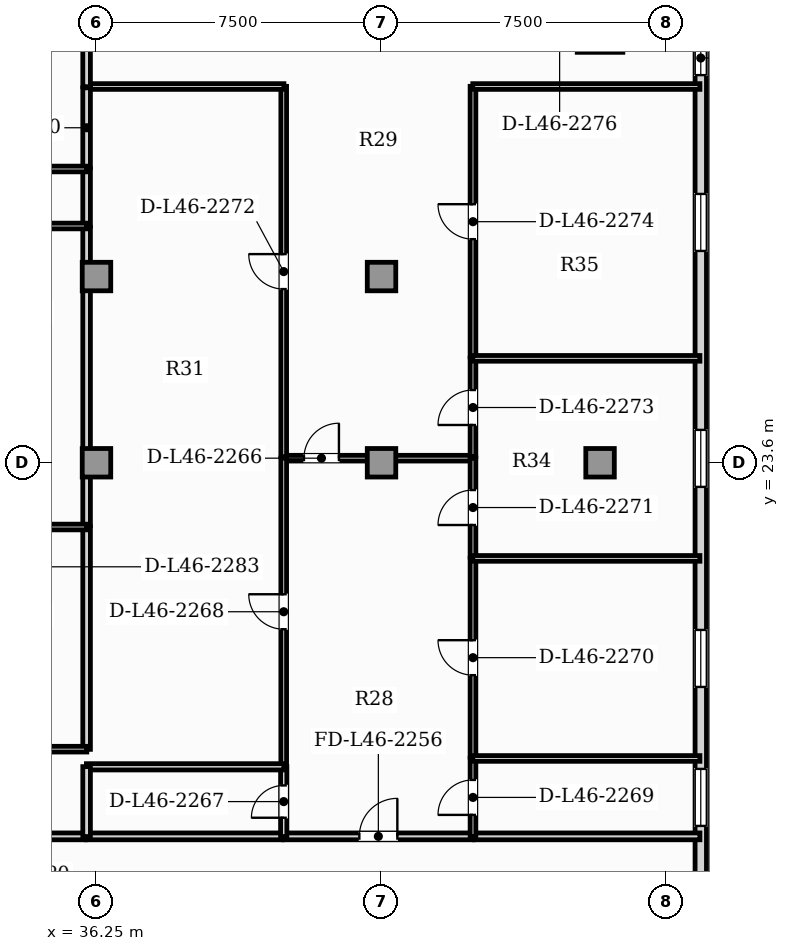
"""IFC4 building model, lengths in metres.
Left out: names, types, materials, properties, quantities, classifications, styles, units other than length and angle.
Written with IfcOpenShell. Run it as: python <this file> out.ifc"""

import sys

from ifc_helpers import new_model, si_unit, direction, frame, frame_2d, origin, origin_2d, place, context, subcontext, project, spatial, rectangle, hollow_rectangle, extrude, element, fill, save


model = new_model("IFC4")
c1 = context("Model", 3, precision=1e-05, world=origin(), true_north=direction((0.0, 1.0)))
c2 = subcontext(c1, "Body", "Model", "MODEL_VIEW")
j1 = project(units=[si_unit("LENGTHUNIT", "METRE"), si_unit("PLANEANGLEUNIT", "RADIAN")], contexts=[c1])
p1 = place(None, origin())
s1 = spatial("IfcSite", under=j1, at=p1, CompositionType="ELEMENT")
p2 = place(p1, origin())
s2 = spatial("IfcBuilding", under=s1, at=p2, CompositionType="ELEMENT")
p3 = place(p2, frame((0.0, 0.0, 187.55)))
s3 = spatial("IfcBuildingStorey", under=s2, at=p3, CompositionType="ELEMENT", Elevation=187.55)
p4 = place(p3, frame((49.5, 35.0, 0.0), z_axis=(0.0, 0.0, 1.0), x_axis=(1.0, 0.0, 0.0)))
e1 = element("IfcColumn", 1, at=p4, inside=s3, PredefinedType="USERDEFINED", context=c2, shape_type="SweptSolid", body=[
    extrude(hollow_rectangle(XDim=1.2, YDim=1.2, WallThickness=0.07, at=origin_2d()), origin(), (0.0, 0.0, 1.0), 5.05),
])
for number, where, z_axis, x_axis in (
    (2, (36.25, 23.6, 0.0), (0.0, 0.0, 1.0), (1.0, 0.0, 0.0)),
    (3, (43.75, 23.6, 0.0), (0.0, 0.0, 1.0), (1.0, 0.0, 0.0)),
    (4, (49.5, 23.6, 0.0), (0.0, 0.0, 1.0), (1.0, 0.0, 0.0)),
    (5, (36.25, 28.5, 0.0), (0.0, 0.0, 1.0), (1.0, 0.0, 0.0)),
    (6, (43.75, 28.5, 0.0), (0.0, 0.0, 1.0), (1.0, 0.0, 0.0)),
):
    element("IfcColumn", number, at=place(p3, frame(where, z_axis=z_axis, x_axis=x_axis)), inside=s3, PredefinedType="COLUMN", context=c2, shape_type="SweptSolid", body=[
        extrude(rectangle(XDim=0.75, YDim=0.75, at=origin_2d()), origin(), (0.0, 0.0, 1.0), 5.05),
    ])
p5 = place(p3, frame((52.15, 3.24, 0.0), z_axis=(0.0, 0.0, 1.0), x_axis=(0.0, 1.0, 0.0)))
e7 = element("IfcWall", 7, at=p5, inside=s3, PredefinedType="SOLIDWALL", context=c2, shape_type="SweptSolid", body=[
    extrude(rectangle(XDim=33.92, YDim=0.3, at=frame_2d((16.96, 0.0))), origin(), (0.0, 0.0, 1.0), 4.83),
])
p6 = place(p5, frame((30.56, 0.0, 0.95)))
e8 = element("IfcOpeningElement", 8, at=p6, cuts=e7, PredefinedType="OPENING", context=c2, shape_type="SweptSolid", body=[
    extrude(rectangle(XDim=0.9, YDim=1.5, at=frame_2d((0.45, 0.75))), frame((0.0, 0.16, 0.0), z_axis=(0.0, -1.0, 0.0), x_axis=(1.0, 0.0, 0.0)), (0.0, 0.0, 1.0), 0.32),
])
p7 = place(p5, frame((10.805, 0.0, 0.9)))
e9 = element("IfcOpeningElement", 9, at=p7, cuts=e7, PredefinedType="OPENING", context=c2, shape_type="SweptSolid", body=[
    extrude(rectangle(XDim=1.5, YDim=1.95, at=frame_2d((0.75, 0.975))), frame((0.0, 0.16, 0.0), z_axis=(0.0, -1.0, 0.0), x_axis=(1.0, 0.0, 0.0)), (0.0, 0.0, 1.0), 0.32),
])
p8 = place(p5, frame((14.462, 0.0, 0.9)))
e10 = element("IfcOpeningElement", 10, at=p8, cuts=e7, PredefinedType="OPENING", context=c2, shape_type="SweptSolid", body=[
    extrude(rectangle(XDim=1.5, YDim=1.95, at=frame_2d((0.75, 0.975))), frame((0.0, 0.16, 0.0), z_axis=(0.0, -1.0, 0.0), x_axis=(1.0, 0.0, 0.0)), (0.0, 0.0, 1.0), 0.32),
])
p9 = place(p5, frame((19.726, 0.0, 0.9)))
e11 = element("IfcOpeningElement", 11, at=p9, cuts=e7, PredefinedType="OPENING", context=c2, shape_type="SweptSolid", body=[
    extrude(rectangle(XDim=1.5, YDim=1.95, at=frame_2d((0.75, 0.975))), frame((0.0, 0.16, 0.0), z_axis=(0.0, -1.0, 0.0), x_axis=(1.0, 0.0, 0.0)), (0.0, 0.0, 1.0), 0.32),
])
p10 = place(p5, frame((25.934, 0.0, 0.9)))
e12 = element("IfcOpeningElement", 12, at=p10, cuts=e7, PredefinedType="OPENING", context=c2, shape_type="SweptSolid", body=[
    extrude(rectangle(XDim=1.5, YDim=1.95, at=frame_2d((0.75, 0.975))), frame((0.0, 0.16, 0.0), z_axis=(0.0, -1.0, 0.0), x_axis=(1.0, 0.0, 0.0)), (0.0, 0.0, 1.0), 0.32),
])
p11 = place(p5, frame((32.24, 0.0, 0.95)))
e13 = element("IfcOpeningElement", 13, at=p11, cuts=e7, PredefinedType="OPENING", context=c2, shape_type="SweptSolid", body=[
    extrude(rectangle(XDim=0.9, YDim=1.5, at=frame_2d((0.45, 0.75))), frame((0.0, 0.16, 0.0), z_axis=(0.0, -1.0, 0.0), x_axis=(1.0, 0.0, 0.0)), (0.0, 0.0, 1.0), 0.32),
])
p12 = place(p3, frame((41.171, 13.77, 0.0), z_axis=(0.0, 0.0, 1.0), x_axis=(1.0, 0.0, 0.0)))
e14 = element("IfcWall", 14, at=p12, inside=s3, PredefinedType="PARTITIONING", context=c2, shape_type="SweptSolid", body=[
    extrude(rectangle(XDim=4.99, YDim=0.18, at=frame_2d((2.495, 0.0))), origin(), (0.0, 0.0, 1.0), 4.83),
])
p13 = place(p12, frame((1.995, 0.0, 0.0)))
e15 = element("IfcOpeningElement", 15, at=p13, cuts=e14, PredefinedType="OPENING", context=c2, shape_type="SweptSolid", body=[
    extrude(rectangle(XDim=1.0, YDim=2.15, at=frame_2d((0.5, 1.075))), frame((0.0, 0.1, 0.0), z_axis=(0.0, -1.0, 0.0), x_axis=(1.0, 0.0, 0.0)), (0.0, 0.0, 1.0), 0.2),
])
p14 = place(p3, frame((35.985, 13.77, 0.0), z_axis=(0.0, 0.0, 1.0), x_axis=(1.0, 0.0, 0.0)))
e16 = element("IfcWall", 16, at=p14, inside=s3, PredefinedType="PARTITIONING", context=c2, shape_type="SweptSolid", body=[
    extrude(rectangle(XDim=5.156, YDim=0.18, at=frame_2d((2.578, 0.0))), origin(), (0.0, 0.0, 1.0), 4.83),
])
p15 = place(p3, frame((46.191, 13.77, 0.0), z_axis=(0.0, 0.0, 1.0), x_axis=(1.0, 0.0, 0.0)))
e17 = element("IfcWall", 17, at=p15, inside=s3, PredefinedType="PARTITIONING", context=c2, shape_type="SweptSolid", body=[
    extrude(rectangle(XDim=5.936, YDim=0.18, at=frame_2d((2.968, 0.0))), origin(), (0.0, 0.0, 1.0), 4.83),
])
p16 = place(p3, frame((31.305, 13.77, 0.0), z_axis=(0.0, 0.0, 1.0), x_axis=(1.0, 0.0, 0.0)))
e18 = element("IfcWall", 18, at=p16, inside=s3, PredefinedType="PARTITIONING", context=c2, shape_type="SweptSolid", body=[
    extrude(rectangle(XDim=4.65, YDim=0.18, at=frame_2d((2.325, 0.0))), origin(), (0.0, 0.0, 1.0), 4.83),
])
p17 = place(p3, frame((41.171, 23.721, 0.0), z_axis=(0.0, 0.0, 1.0), x_axis=(1.0, 0.0, 0.0)))
e19 = element("IfcWall", 19, at=p17, inside=s3, PredefinedType="PARTITIONING", context=c2, shape_type="SweptSolid", body=[
    extrude(rectangle(XDim=4.99, YDim=0.15, at=frame_2d((2.495, 0.0))), origin(), (0.0, 0.0, 1.0), 4.285),
])
p18 = place(p17, frame((0.538, 0.0, 0.0)))
e20 = element("IfcOpeningElement", 20, at=p18, cuts=e19, PredefinedType="OPENING", context=c2, shape_type="SweptSolid", body=[
    extrude(rectangle(XDim=0.92, YDim=2.1, at=frame_2d((0.46, 1.05))), frame((0.0, 0.085, 0.0), z_axis=(0.0, -1.0, 0.0), x_axis=(1.0, 0.0, 0.0)), (0.0, 0.0, 1.0), 0.17),
])
p19 = place(p3, frame((41.177, 13.765, 0.0), z_axis=(0.0, 0.0, 1.0), x_axis=(0.0, 1.0, 0.0)))
e21 = element("IfcWall", 21, at=p19, inside=s3, PredefinedType="PLUMBINGWALL", context=c2, shape_type="SweptSolid", body=[
    extrude(rectangle(XDim=1.84, YDim=0.165, at=frame_2d((0.92, 0.0))), origin(), (0.0, 0.0, 1.0), 4.83),
])
p20 = place(p19, frame((0.495, 0.0, 0.0)))
e22 = element("IfcOpeningElement", 22, at=p20, cuts=e21, PredefinedType="OPENING", context=c2, shape_type="SweptSolid", body=[
    extrude(rectangle(XDim=0.85, YDim=2.1, at=frame_2d((0.425, 1.05))), frame((0.0, 0.093, 0.0), z_axis=(0.0, -1.0, 0.0), x_axis=(1.0, 0.0, 0.0)), (0.0, 0.0, 1.0), 0.185),
])
p21 = place(p3, frame((41.177, 15.635, 0.0), z_axis=(0.0, 0.0, 1.0), x_axis=(0.0, 1.0, 0.0)))
e23 = element("IfcWall", 23, at=p21, inside=s3, PredefinedType="PARTITIONING", context=c2, shape_type="SweptSolid", body=[
    extrude(rectangle(XDim=8.091, YDim=0.15, at=frame_2d((4.045, 0.0))), origin(), (0.0, 0.0, 1.0), 4.83),
])
p22 = place(p21, frame((3.585, 0.0, 0.0)))
e24 = element("IfcOpeningElement", 24, at=p22, cuts=e23, PredefinedType="OPENING", context=c2, shape_type="SweptSolid", body=[
    extrude(rectangle(XDim=0.92, YDim=2.1, at=frame_2d((0.46, 1.05))), frame((0.0, 0.085, 0.0), z_axis=(0.0, -1.0, 0.0), x_axis=(1.0, 0.0, 0.0)), (0.0, 0.0, 1.0), 0.17),
])
p23 = place(p3, frame((46.156, 13.765, 0.0), z_axis=(0.0, 0.0, 1.0), x_axis=(0.0, 1.0, 0.0)))
e25 = element("IfcWall", 25, at=p23, inside=s3, PredefinedType="PARTITIONING", context=c2, shape_type="SweptSolid", body=[
    extrude(rectangle(XDim=2.06, YDim=0.15, at=frame_2d((1.03, 0.0))), origin(), (0.0, 0.0, 1.0), 4.83),
])
p24 = place(p23, frame((0.57, 0.0, 0.0)))
e26 = element("IfcOpeningElement", 26, at=p24, cuts=e25, PredefinedType="OPENING", context=c2, shape_type="SweptSolid", body=[
    extrude(rectangle(XDim=0.92, YDim=2.1, at=frame_2d((0.46, 1.05))), frame((0.0, 0.085, 0.0), z_axis=(0.0, -1.0, 0.0), x_axis=(1.0, 0.0, 0.0)), (0.0, 0.0, 1.0), 0.17),
])
p25 = place(p3, frame((46.156, 15.855, 0.0), z_axis=(0.0, 0.0, 1.0), x_axis=(0.0, 1.0, 0.0)))
e27 = element("IfcWall", 27, at=p25, inside=s3, PredefinedType="PARTITIONING", context=c2, shape_type="SweptSolid", body=[
    extrude(rectangle(XDim=5.234, YDim=0.15, at=frame_2d((2.617, 0.0))), origin(), (0.0, 0.0, 1.0), 4.83),
])
p26 = place(p25, frame((2.157, 0.0, 0.0)))
e28 = element("IfcOpeningElement", 28, at=p26, cuts=e27, PredefinedType="OPENING", context=c2, shape_type="SweptSolid", body=[
    extrude(rectangle(XDim=0.92, YDim=2.1, at=frame_2d((0.46, 1.05))), frame((0.0, 0.085, 0.0), z_axis=(0.0, -1.0, 0.0), x_axis=(1.0, 0.0, 0.0)), (0.0, 0.0, 1.0), 0.17),
])
p27 = place(p3, frame((46.156, 21.119, 0.0), z_axis=(0.0, 0.0, 1.0), x_axis=(0.0, 1.0, 0.0)))
e29 = element("IfcWall", 29, at=p27, inside=s3, PredefinedType="PARTITIONING", context=c2, shape_type="SweptSolid", body=[
    extrude(rectangle(XDim=2.607, YDim=0.15, at=frame_2d((1.304, 0.0))), origin(), (0.0, 0.0, 1.0), 4.83),
])
p28 = place(p27, frame((0.844, 0.0, 0.0)))
e30 = element("IfcOpeningElement", 30, at=p28, cuts=e29, PredefinedType="OPENING", context=c2, shape_type="SweptSolid", body=[
    extrude(rectangle(XDim=0.92, YDim=2.1, at=frame_2d((0.46, 1.05))), frame((0.0, 0.085, 0.0), z_axis=(0.0, -1.0, 0.0), x_axis=(1.0, 0.0, 0.0)), (0.0, 0.0, 1.0), 0.17),
])
p29 = place(p3, frame((41.177, 23.756, 0.0), z_axis=(0.0, 0.0, 1.0), x_axis=(0.0, 1.0, 0.0)))
e31 = element("IfcWall", 31, at=p29, inside=s3, PredefinedType="PARTITIONING", context=c2, shape_type="SweptSolid", body=[
    extrude(rectangle(XDim=9.749, YDim=0.15, at=frame_2d((4.875, 0.0))), origin(), (0.0, 0.0, 1.0), 4.83),
])
p30 = place(p29, frame((4.415, 0.0, 0.0)))
e32 = element("IfcOpeningElement", 32, at=p30, cuts=e31, PredefinedType="OPENING", context=c2, shape_type="SweptSolid", body=[
    extrude(rectangle(XDim=0.92, YDim=2.1, at=frame_2d((0.46, 1.05))), frame((0.0, 0.085, 0.0), z_axis=(0.0, -1.0, 0.0), x_axis=(1.0, 0.0, 0.0)), (0.0, 0.0, 1.0), 0.17),
])
p31 = place(p3, frame((35.985, 33.5, 0.0), z_axis=(0.0, 0.0, 1.0), x_axis=(1.0, 0.0, 0.0)))
e33 = element("IfcWall", 33, at=p31, inside=s3, PredefinedType="PARTITIONING", context=c2, shape_type="SweptSolid", body=[
    extrude(rectangle(XDim=5.196, YDim=0.15, at=frame_2d((2.598, 0.0))), origin(), (0.0, 0.0, 1.0), 4.83),
])
p32 = place(p3, frame((46.156, 23.756, 0.0), z_axis=(0.0, 0.0, 1.0), x_axis=(0.0, 1.0, 0.0)))
e34 = element("IfcWall", 34, at=p32, inside=s3, PredefinedType="PARTITIONING", context=c2, shape_type="SweptSolid", body=[
    extrude(rectangle(XDim=2.596, YDim=0.15, at=frame_2d((1.298, 0.0))), origin(), (0.0, 0.0, 1.0), 4.83),
])
p33 = place(p32, frame((0.838, 0.0, 0.0)))
e35 = element("IfcOpeningElement", 35, at=p33, cuts=e34, PredefinedType="OPENING", context=c2, shape_type="SweptSolid", body=[
    extrude(rectangle(XDim=0.92, YDim=2.1, at=frame_2d((0.46, 1.05))), frame((0.0, 0.085, 0.0), z_axis=(0.0, -1.0, 0.0), x_axis=(1.0, 0.0, 0.0)), (0.0, 0.0, 1.0), 0.17),
])
p34 = place(p3, frame((46.156, 26.382, 0.0), z_axis=(0.0, 0.0, 1.0), x_axis=(0.0, 1.0, 0.0)))
e36 = element("IfcWall", 36, at=p34, inside=s3, PredefinedType="PARTITIONING", context=c2, shape_type="SweptSolid", body=[
    extrude(rectangle(XDim=7.123, YDim=0.15, at=frame_2d((3.561, 0.0))), origin(), (0.0, 0.0, 1.0), 4.83),
])
p35 = place(p34, frame((3.101, 0.0, 0.0)))
e37 = element("IfcOpeningElement", 37, at=p35, cuts=e36, PredefinedType="OPENING", context=c2, shape_type="SweptSolid", body=[
    extrude(rectangle(XDim=0.92, YDim=2.1, at=frame_2d((0.46, 1.05))), frame((0.0, 0.085, 0.0), z_axis=(0.0, -1.0, 0.0), x_axis=(1.0, 0.0, 0.0)), (0.0, 0.0, 1.0), 0.17),
])
p36 = place(p3, frame((46.151, 33.5, 0.0), z_axis=(0.0, 0.0, 1.0), x_axis=(1.0, 0.0, 0.0)))
e38 = element("IfcWall", 38, at=p36, inside=s3, PredefinedType="PARTITIONING", context=c2, shape_type="SweptSolid", body=[
    extrude(rectangle(XDim=5.976, YDim=0.15, at=frame_2d((2.988, 0.0))), origin(), (0.0, 0.0, 1.0), 4.83),
])
p37 = place(p3, frame((35.99, 33.495, 0.0), z_axis=(0.0, 0.0, 1.0), x_axis=(0.0, 1.0, 0.0)))
e39 = element("IfcWall", 39, at=p37, inside=s3, PredefinedType="PARTITIONING", context=c2, shape_type="SweptSolid", body=[
    extrude(rectangle(XDim=2.988, YDim=0.2, at=frame_2d((1.494, 0.0))), origin(), (0.0, 0.0, 1.0), 4.83),
])
p38 = place(p3, frame((35.985, 15.6, 0.0), z_axis=(0.0, 0.0, 1.0), x_axis=(1.0, 0.0, 0.0)))
e40 = element("IfcWall", 40, at=p38, inside=s3, PredefinedType="PLUMBINGWALL", context=c2, shape_type="SweptSolid", body=[
    extrude(rectangle(XDim=5.196, YDim=0.165, at=frame_2d((2.598, 0.0))), origin(), (0.0, 0.0, 1.0), 4.83),
])
p39 = place(p3, frame((35.99, 13.765, 0.0), z_axis=(0.0, 0.0, 1.0), x_axis=(0.0, 1.0, 0.0)))
e41 = element("IfcWall", 41, at=p39, inside=s3, PredefinedType="PARTITIONING", context=c2, shape_type="SweptSolid", body=[
    extrude(rectangle(XDim=1.84, YDim=0.2, at=frame_2d((0.92, 0.0))), origin(), (0.0, 0.0, 1.0), 4.83),
])
p40 = place(p3, frame((35.99, 29.825, 0.0), z_axis=(0.0, 0.0, 1.0), x_axis=(0.0, 1.0, 0.0)))
e42 = element("IfcWall", 42, at=p40, inside=s3, PredefinedType="PARTITIONING", context=c2, shape_type="SweptSolid", body=[
    extrude(rectangle(XDim=1.51, YDim=0.2, at=frame_2d((0.755, 0.0))), origin(), (0.0, 0.0, 1.0), 4.83),
])
p41 = place(p3, frame((35.99, 16.059, 0.0), z_axis=(0.0, 0.0, 1.0), x_axis=(0.0, 1.0, 0.0)))
e43 = element("IfcWall", 43, at=p41, inside=s3, PredefinedType="PARTITIONING", context=c2, shape_type="SweptSolid", body=[
    extrude(rectangle(XDim=5.855, YDim=0.2, at=frame_2d((2.928, 0.0))), origin(), (0.0, 0.0, 1.0), 4.83),
])
p42 = place(p3, frame((35.99, 21.945, 0.0), z_axis=(0.0, 0.0, 1.0), x_axis=(0.0, 1.0, 0.0)))
e44 = element("IfcWall", 44, at=p42, inside=s3, PredefinedType="PARTITIONING", context=c2, shape_type="SweptSolid", body=[
    extrude(rectangle(XDim=7.85, YDim=0.2, at=frame_2d((3.925, 0.0))), origin(), (0.0, 0.0, 1.0), 4.83),
])
p43 = place(p3, frame((35.99, 31.365, 0.0), z_axis=(0.0, 0.0, 1.0), x_axis=(0.0, 1.0, 0.0)))
e45 = element("IfcWall", 45, at=p43, inside=s3, PredefinedType="PARTITIONING", context=c2, shape_type="SweptSolid", body=[
    extrude(rectangle(XDim=2.1, YDim=0.2, at=frame_2d((1.05, 0.0))), origin(), (0.0, 0.0, 1.0), 4.83),
])
for number, where, z_axis, x_axis in (
    (46, (46.151, 15.82, 0.0), (0.0, 0.0, 1.0), (1.0, 0.0, 0.0)),
    (47, (46.151, 21.084, 0.0), (0.0, 0.0, 1.0), (1.0, 0.0, 0.0)),
    (48, (46.151, 26.347, 0.0), (0.0, 0.0, 1.0), (1.0, 0.0, 0.0)),
):
    element("IfcWall", number, at=place(p3, frame(where, z_axis=z_axis, x_axis=x_axis)), inside=s3, PredefinedType="PARTITIONING", context=c2, shape_type="SweptSolid", body=[
        extrude(rectangle(XDim=5.976, YDim=0.15, at=frame_2d((2.988, 0.0))), origin(), (0.0, 0.0, 1.0), 4.83),
    ])
p44 = place(p3, frame((31.265, 29.83, 0.0), z_axis=(0.0, 0.0, 1.0), x_axis=(1.0, 0.0, 0.0)))
e49 = element("IfcWall", 49, at=p44, inside=s3, PredefinedType="PARTITIONING", context=c2, shape_type="SweptSolid", body=[
    extrude(rectangle(XDim=4.73, YDim=0.15, at=frame_2d((2.365, 0.0))), origin(), (0.0, 0.0, 1.0), 4.83),
])
p45 = place(p3, frame((28.785, 31.33, 0.0), z_axis=(0.0, 0.0, 1.0), x_axis=(1.0, 0.0, 0.0)))
e50 = element("IfcWall", 50, at=p45, inside=s3, PredefinedType="PARTITIONING", context=c2, shape_type="SweptSolid", body=[
    extrude(rectangle(XDim=7.21, YDim=0.15, at=frame_2d((3.605, 0.0))), origin(), (0.0, 0.0, 1.0), 4.83),
])
p46 = place(p45, frame((3.145, 0.0, 0.0)))
e51 = element("IfcOpeningElement", 51, at=p46, cuts=e50, PredefinedType="OPENING", context=c2, shape_type="SweptSolid", body=[
    extrude(rectangle(XDim=0.92, YDim=2.1, at=frame_2d((0.46, 1.05))), frame((0.0, 0.085, 0.0), z_axis=(0.0, -1.0, 0.0), x_axis=(1.0, 0.0, 0.0)), (0.0, 0.0, 1.0), 0.17),
])
for number, where, z_axis, x_axis in (
    (52, (31.265, 16.064, 0.0), (0.0, 0.0, 1.0), (1.0, 0.0, 0.0)),
    (53, (31.265, 21.91, 0.0), (0.0, 0.0, 1.0), (1.0, 0.0, 0.0)),
):
    element("IfcWall", number, at=place(p3, frame(where, z_axis=z_axis, x_axis=x_axis)), inside=s3, PredefinedType="PARTITIONING", context=c2, shape_type="SweptSolid", body=[
        extrude(rectangle(XDim=4.73, YDim=0.15, at=frame_2d((2.365, 0.0))), origin(), (0.0, 0.0, 1.0), 4.83),
    ])
p47 = place(p6, origin())
e54 = element("IfcWindow", 54, at=p47, inside=s3, PartitioningType="SINGLE_PANEL", PredefinedType="WINDOW", context=c2, shape_type="SweptSolid", body=[
    extrude(rectangle(XDim=0.9, YDim=1.5, at=frame_2d((0.45, 0.75))), frame((0.0, 0.03, 0.0), z_axis=(0.0, -1.0, 0.0), x_axis=(1.0, 0.0, 0.0)), (0.0, 0.0, 1.0), 0.06),
])
fill(e8, e54)
p48 = place(p7, origin())
e55 = element("IfcWindow", 55, at=p48, inside=s3, PartitioningType="SINGLE_PANEL", PredefinedType="WINDOW", context=c2, shape_type="SweptSolid", body=[
    extrude(rectangle(XDim=1.5, YDim=1.95, at=frame_2d((0.75, 0.975))), frame((0.0, 0.03, 0.0), z_axis=(0.0, -1.0, 0.0), x_axis=(1.0, 0.0, 0.0)), (0.0, 0.0, 1.0), 0.06),
])
fill(e9, e55)
p49 = place(p8, origin())
e56 = element("IfcWindow", 56, at=p49, inside=s3, PartitioningType="SINGLE_PANEL", PredefinedType="WINDOW", context=c2, shape_type="SweptSolid", body=[
    extrude(rectangle(XDim=1.5, YDim=1.95, at=frame_2d((0.75, 0.975))), frame((0.0, 0.03, 0.0), z_axis=(0.0, -1.0, 0.0), x_axis=(1.0, 0.0, 0.0)), (0.0, 0.0, 1.0), 0.06),
])
fill(e10, e56)
p50 = place(p9, origin())
e57 = element("IfcWindow", 57, at=p50, inside=s3, PartitioningType="SINGLE_PANEL", PredefinedType="WINDOW", context=c2, shape_type="SweptSolid", body=[
    extrude(rectangle(XDim=1.5, YDim=1.95, at=frame_2d((0.75, 0.975))), frame((0.0, 0.03, 0.0), z_axis=(0.0, -1.0, 0.0), x_axis=(1.0, 0.0, 0.0)), (0.0, 0.0, 1.0), 0.06),
])
fill(e11, e57)
p51 = place(p10, origin())
e58 = element("IfcWindow", 58, at=p51, inside=s3, PartitioningType="SINGLE_PANEL", PredefinedType="WINDOW", context=c2, shape_type="SweptSolid", body=[
    extrude(rectangle(XDim=1.5, YDim=1.95, at=frame_2d((0.75, 0.975))), frame((0.0, 0.03, 0.0), z_axis=(0.0, -1.0, 0.0), x_axis=(1.0, 0.0, 0.0)), (0.0, 0.0, 1.0), 0.06),
])
fill(e12, e58)
p52 = place(p13, origin())
e59 = element("IfcDoor", 59, at=p52, inside=s3, OperationType="SINGLE_SWING_RIGHT", PredefinedType="DOOR", context=c2, shape_type="SweptSolid", body=[
    extrude(rectangle(XDim=1.0, YDim=2.15, at=frame_2d((0.5, 1.075))), frame((0.0, 0.025, 0.0), z_axis=(0.0, -1.0, 0.0), x_axis=(1.0, 0.0, 0.0)), (0.0, 0.0, 1.0), 0.05),
])
fill(e15, e59)
p53 = place(p18, origin())
e60 = element("IfcDoor", 60, at=p53, inside=s3, OperationType="SINGLE_SWING_RIGHT", PredefinedType="DOOR", context=c2, shape_type="SweptSolid", body=[
    extrude(rectangle(XDim=0.92, YDim=2.1, at=frame_2d((0.46, 1.05))), frame((0.0, 0.025, 0.0), z_axis=(0.0, -1.0, 0.0), x_axis=(1.0, 0.0, 0.0)), (0.0, 0.0, 1.0), 0.05),
])
fill(e20, e60)
p54 = place(p20, origin())
e61 = element("IfcDoor", 61, at=p54, inside=s3, OperationType="SINGLE_SWING_LEFT", PredefinedType="DOOR", context=c2, shape_type="SweptSolid", body=[
    extrude(rectangle(XDim=0.85, YDim=2.1, at=frame_2d((0.425, 1.05))), frame((0.0, 0.025, 0.0), z_axis=(0.0, -1.0, 0.0), x_axis=(1.0, 0.0, 0.0)), (0.0, 0.0, 1.0), 0.05),
])
fill(e22, e61)
p55 = place(p22, origin())
e62 = element("IfcDoor", 62, at=p55, inside=s3, OperationType="SINGLE_SWING_RIGHT", PredefinedType="DOOR", context=c2, shape_type="SweptSolid", body=[
    extrude(rectangle(XDim=0.92, YDim=2.1, at=frame_2d((0.46, 1.05))), frame((0.0, 0.025, 0.0), z_axis=(0.0, -1.0, 0.0), x_axis=(1.0, 0.0, 0.0)), (0.0, 0.0, 1.0), 0.05),
])
fill(e24, e62)
p56 = place(p24, origin())
e63 = element("IfcDoor", 63, at=p56, inside=s3, OperationType="SINGLE_SWING_LEFT", PredefinedType="DOOR", context=c2, shape_type="SweptSolid", body=[
    extrude(rectangle(XDim=0.92, YDim=2.1, at=frame_2d((0.46, 1.05))), frame((0.0, 0.025, 0.0), z_axis=(0.0, -1.0, 0.0), x_axis=(1.0, 0.0, 0.0)), (0.0, 0.0, 1.0), 0.05),
])
fill(e26, e63)
p57 = place(p26, origin())
e64 = element("IfcDoor", 64, at=p57, inside=s3, OperationType="SINGLE_SWING_RIGHT", PredefinedType="DOOR", context=c2, shape_type="SweptSolid", body=[
    extrude(rectangle(XDim=0.92, YDim=2.1, at=frame_2d((0.46, 1.05))), frame((0.0, 0.025, 0.0), z_axis=(0.0, -1.0, 0.0), x_axis=(1.0, 0.0, 0.0)), (0.0, 0.0, 1.0), 0.05),
])
fill(e28, e64)
p58 = place(p28, origin())
e65 = element("IfcDoor", 65, at=p58, inside=s3, OperationType="SINGLE_SWING_LEFT", PredefinedType="DOOR", context=c2, shape_type="SweptSolid", body=[
    extrude(rectangle(XDim=0.92, YDim=2.1, at=frame_2d((0.46, 1.05))), frame((0.0, 0.025, 0.0), z_axis=(0.0, -1.0, 0.0), x_axis=(1.0, 0.0, 0.0)), (0.0, 0.0, 1.0), 0.05),
])
fill(e30, e65)
p59 = place(p30, origin())
e66 = element("IfcDoor", 66, at=p59, inside=s3, OperationType="SINGLE_SWING_RIGHT", PredefinedType="DOOR", context=c2, shape_type="SweptSolid", body=[
    extrude(rectangle(XDim=0.92, YDim=2.1, at=frame_2d((0.46, 1.05))), frame((0.0, 0.025, 0.0), z_axis=(0.0, -1.0, 0.0), x_axis=(1.0, 0.0, 0.0)), (0.0, 0.0, 1.0), 0.05),
])
fill(e32, e66)
p60 = place(p33, origin())
e67 = element("IfcDoor", 67, at=p60, inside=s3, OperationType="SINGLE_SWING_LEFT", PredefinedType="DOOR", context=c2, shape_type="SweptSolid", body=[
    extrude(rectangle(XDim=0.92, YDim=2.1, at=frame_2d((0.46, 1.05))), frame((0.0, 0.025, 0.0), z_axis=(0.0, -1.0, 0.0), x_axis=(1.0, 0.0, 0.0)), (0.0, 0.0, 1.0), 0.05),
])
fill(e35, e67)
p61 = place(p35, origin())
e68 = element("IfcDoor", 68, at=p61, inside=s3, OperationType="SINGLE_SWING_RIGHT", PredefinedType="DOOR", context=c2, shape_type="SweptSolid", body=[
    extrude(rectangle(XDim=0.92, YDim=2.1, at=frame_2d((0.46, 1.05))), frame((0.0, 0.025, 0.0), z_axis=(0.0, -1.0, 0.0), x_axis=(1.0, 0.0, 0.0)), (0.0, 0.0, 1.0), 0.05),
])
fill(e37, e68)
save(model, sys.argv[1])
